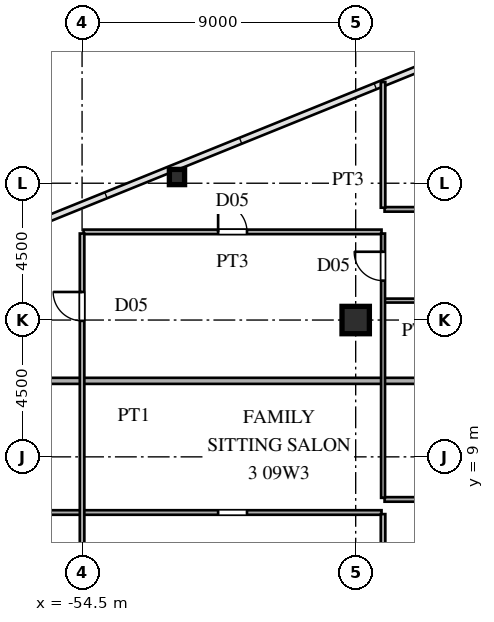
"""IFC4 building model, lengths in metres.
Left out: names, types, materials, properties, quantities, classifications, styles, units other than length and angle.
Written with IfcOpenShell. Run it as: python <this file> out.ifc"""

import sys

from ifc_helpers import new_model, si_unit, direction, frame, frame_2d, origin, origin_2d, place, context, subcontext, project, spatial, rectangle, hollow_rectangle, i_section, extrude, source, transform, mapped, element, fill, save


model = new_model("IFC4")
c1 = context("Model", 3, precision=1e-05, world=origin(), true_north=direction((0.0, 1.0)))
c2 = subcontext(c1, "Body", "Model", "MODEL_VIEW")
j1 = project(units=[si_unit("LENGTHUNIT", "METRE"), si_unit("PLANEANGLEUNIT", "RADIAN")], contexts=[c1])
p1 = place(None, origin())
s1 = spatial("IfcSite", under=j1, at=p1, CompositionType="ELEMENT")
p2 = place(p1, origin())
s2 = spatial("IfcBuilding", under=s1, at=p2, CompositionType="ELEMENT")
p3 = place(p2, frame((0.0, 0.0, 36.9)))
s3 = spatial("IfcBuildingStorey", under=s2, at=p3, CompositionType="ELEMENT", Elevation=36.9)
m1 = source(origin(), c2, "Body", "SweptSolid", [
    extrude(i_section(OverallWidth=0.9, OverallDepth=0.9, WebThickness=0.036, FlangeThickness=0.055, at=origin_2d()), origin(), (0.0, 0.0, 1.0), 3.6),
])
p4 = place(p3, frame((-45.5, 13.5, 0.0), z_axis=(0.0, 0.0, 1.0), x_axis=(1.0, 0.0, 0.0)))
e1 = element("IfcColumn", 1, at=p4, inside=s3, PredefinedType="COLUMN", context=c2, shape_type="MappedRepresentation", body=[
    mapped(m1, transform((0.0, 0.0, 0.0), scale=1.0)),
])
m2 = source(origin(), c2, "Body", "SweptSolid", [
    extrude(hollow_rectangle(XDim=0.5, YDim=0.5, WallThickness=0.02, at=origin_2d()), origin(), (0.0, 0.0, 1.0), 3.6),
])
p5 = place(p3, frame((-51.378, 18.204, 0.0), z_axis=(0.0, 0.0, 1.0), x_axis=(1.0, 0.0, 0.0)))
e2 = element("IfcColumn", 2, at=p5, inside=s3, PredefinedType="COLUMN", context=c2, shape_type="MappedRepresentation", body=[
    mapped(m2, transform((0.0, 0.0, 0.0), scale=1.0)),
])
p6 = place(p3, frame((-72.535, 7.17, 0.0), z_axis=(0.0, 0.0, 1.0), x_axis=(1.0, 0.0, 0.0)))
e3 = element("IfcWall", 3, at=p6, inside=s3, PredefinedType="PARTITIONING", context=c2, shape_type="SweptSolid", body=[
    extrude(rectangle(XDim=27.885, YDim=0.15, at=frame_2d((13.942, 0.0))), origin(), (0.0, 0.0, 1.0), 3.38),
])
p7 = place(p6, frame((22.51, 0.0, 0.0)))
e4 = element("IfcOpeningElement", 4, at=p7, cuts=e3, PredefinedType="OPENING", context=c2, shape_type="SweptSolid", body=[
    extrude(rectangle(XDim=0.95, YDim=2.15, at=frame_2d((0.475, 1.075))), frame((0.0, 0.085, 0.0), z_axis=(0.0, -1.0, 0.0), x_axis=(1.0, 0.0, 0.0)), (0.0, 0.0, 1.0), 0.17),
])
p8 = place(p6, frame((14.71, 0.0, 0.0)))
e5 = element("IfcOpeningElement", 5, at=p8, cuts=e3, PredefinedType="OPENING", context=c2, shape_type="SweptSolid", body=[
    extrude(rectangle(XDim=0.95, YDim=2.15, at=frame_2d((0.475, 1.075))), frame((0.0, 0.085, 0.0), z_axis=(0.0, -1.0, 0.0), x_axis=(1.0, 0.0, 0.0)), (0.0, 0.0, 1.0), 0.17),
])
p9 = place(p3, frame((-44.55, 7.6, 0.0), z_axis=(0.0, 0.0, 1.0), x_axis=(1.0, 0.0, 0.0)))
e6 = element("IfcWall", 6, at=p9, inside=s3, PredefinedType="PARTITIONING", context=c2, shape_type="SweptSolid", body=[
    extrude(rectangle(XDim=5.5, YDim=0.15, at=frame_2d((2.75, 0.0))), origin(), (0.0, 0.0, 1.0), 3.38),
])
p10 = place(p9, frame((2.275, 0.0, 0.0)))
e7 = element("IfcOpeningElement", 7, at=p10, cuts=e6, PredefinedType="OPENING", context=c2, shape_type="SweptSolid", body=[
    extrude(rectangle(XDim=0.95, YDim=2.15, at=frame_2d((0.475, 1.075))), frame((0.0, 0.085, 0.0), z_axis=(0.0, -1.0, 0.0), x_axis=(1.0, 0.0, 0.0)), (0.0, 0.0, 1.0), 0.17),
])
p11 = place(p3, frame((-68.807, 11.5, 0.0), z_axis=(0.0, 0.0, 1.0), x_axis=(1.0, 0.0, 0.0)))
e8 = element("IfcWall", 8, at=p11, inside=s3, PredefinedType="PARTITIONING", context=c2, shape_type="SweptSolid", body=[
    extrude(rectangle(XDim=29.727, YDim=0.2, at=frame_2d((14.863, 0.0))), origin(), (0.0, 0.0, 1.0), 3.38),
])
p12 = place(p3, frame((-44.55, 14.14, 0.0), z_axis=(0.0, 0.0, 1.0), x_axis=(1.0, 0.0, 0.0)))
e9 = element("IfcWall", 9, at=p12, inside=s3, PredefinedType="PARTITIONING", context=c2, shape_type="SweptSolid", body=[
    extrude(rectangle(XDim=5.5, YDim=0.13, at=frame_2d((2.75, 0.0))), origin(), (0.0, 0.0, 1.0), 3.38),
])
p13 = place(p12, frame((2.31, 0.0, 0.0)))
e10 = element("IfcOpeningElement", 10, at=p13, cuts=e9, PredefinedType="OPENING", context=c2, shape_type="SweptSolid", body=[
    extrude(rectangle(XDim=0.88, YDim=2.1, at=frame_2d((0.44, 1.05))), frame((0.0, 0.075, 0.0), z_axis=(0.0, -1.0, 0.0), x_axis=(1.0, 0.0, 0.0)), (0.0, 0.0, 1.0), 0.15),
])
p14 = place(p3, frame((-54.45, 16.4, 0.0), z_axis=(0.0, 0.0, 1.0), x_axis=(1.0, 0.0, 0.0)))
e11 = element("IfcWall", 11, at=p14, inside=s3, PredefinedType="PARTITIONING", context=c2, shape_type="SweptSolid", body=[
    extrude(rectangle(XDim=9.8, YDim=0.15, at=frame_2d((4.9, 0.0))), origin(), (0.0, 0.0, 1.0), 3.38),
])
p15 = place(p14, frame((4.425, 0.0, 0.0)))
e12 = element("IfcOpeningElement", 12, at=p15, cuts=e11, PredefinedType="OPENING", context=c2, shape_type="SweptSolid", body=[
    extrude(rectangle(XDim=0.95, YDim=2.15, at=frame_2d((0.475, 1.075))), frame((0.0, 0.085, 0.0), z_axis=(0.0, -1.0, 0.0), x_axis=(1.0, 0.0, 0.0)), (0.0, 0.0, 1.0), 0.17),
])
p16 = place(p3, frame((-44.55, 17.14, 0.0), z_axis=(0.0, 0.0, 1.0), x_axis=(1.0, 0.0, 0.0)))
e13 = element("IfcWall", 13, at=p16, inside=s3, PredefinedType="PARTITIONING", context=c2, shape_type="SweptSolid", body=[
    extrude(rectangle(XDim=5.55, YDim=0.15, at=frame_2d((2.775, 0.0))), origin(), (0.0, 0.0, 1.0), 3.38),
])
p17 = place(p16, frame((2.3, 0.0, 0.0)))
e14 = element("IfcOpeningElement", 14, at=p17, cuts=e13, PredefinedType="OPENING", context=c2, shape_type="SweptSolid", body=[
    extrude(rectangle(XDim=0.95, YDim=2.15, at=frame_2d((0.475, 1.075))), frame((0.0, 0.085, 0.0), z_axis=(0.0, -1.0, 0.0), x_axis=(1.0, 0.0, 0.0)), (0.0, 0.0, 1.0), 0.17),
])
p18 = place(p3, frame((-54.5, -17.321, 0.0), z_axis=(0.0, 0.0, 1.0), x_axis=(0.0, 1.0, 0.0)))
e15 = element("IfcWall", 15, at=p18, inside=s3, PredefinedType="PARTITIONING", context=c2, shape_type="SweptSolid", body=[
    extrude(rectangle(XDim=33.667, YDim=0.15, at=frame_2d((16.833, 0.0))), origin(), (0.0, 0.0, 1.0), 2.68),
])
p19 = place(p18, frame((0.988, 0.0, 0.0)))
e16 = element("IfcOpeningElement", 16, at=p19, cuts=e15, PredefinedType="OPENING", context=c2, shape_type="SweptSolid", body=[
    extrude(rectangle(XDim=0.95, YDim=2.15, at=frame_2d((0.475, 1.075))), frame((0.0, 0.085, 0.0), z_axis=(0.0, -1.0, 0.0), x_axis=(1.0, 0.0, 0.0)), (0.0, 0.0, 1.0), 0.17),
])
p20 = place(p18, frame((4.131, 0.0, 0.0)))
e17 = element("IfcOpeningElement", 17, at=p20, cuts=e15, PredefinedType="OPENING", context=c2, shape_type="SweptSolid", body=[
    extrude(rectangle(XDim=0.95, YDim=2.15, at=frame_2d((0.475, 1.075))), frame((0.0, 0.085, 0.0), z_axis=(0.0, -1.0, 0.0), x_axis=(1.0, 0.0, 0.0)), (0.0, 0.0, 1.0), 0.17),
])
p21 = place(p18, frame((8.221, 0.0, 0.0)))
e18 = element("IfcOpeningElement", 18, at=p21, cuts=e15, PredefinedType="OPENING", context=c2, shape_type="SweptSolid", body=[
    extrude(rectangle(XDim=0.95, YDim=2.15, at=frame_2d((0.475, 1.075))), frame((0.0, 0.085, 0.0), z_axis=(0.0, -1.0, 0.0), x_axis=(1.0, 0.0, 0.0)), (0.0, 0.0, 1.0), 0.17),
])
p22 = place(p18, frame((22.357, 0.0, 0.0)))
e19 = element("IfcOpeningElement", 19, at=p22, cuts=e15, PredefinedType="OPENING", context=c2, shape_type="SweptSolid", body=[
    extrude(rectangle(XDim=0.95, YDim=2.15, at=frame_2d((0.475, 1.075))), frame((0.0, 0.085, 0.0), z_axis=(0.0, -1.0, 0.0), x_axis=(1.0, 0.0, 0.0)), (0.0, 0.0, 1.0), 0.17),
])
p23 = place(p18, frame((30.794, 0.0, 0.0)))
e20 = element("IfcOpeningElement", 20, at=p23, cuts=e15, PredefinedType="OPENING", context=c2, shape_type="SweptSolid", body=[
    extrude(rectangle(XDim=0.95, YDim=2.15, at=frame_2d((0.475, 1.075))), frame((0.0, 0.085, 0.0), z_axis=(0.0, -1.0, 0.0), x_axis=(1.0, 0.0, 0.0)), (0.0, 0.0, 1.0), 0.17),
])
p24 = place(p3, frame((-44.6, 2.883, 0.0), z_axis=(0.0, 0.0, 1.0), x_axis=(0.0, 1.0, 0.0)))
e21 = element("IfcWall", 21, at=p24, inside=s3, PredefinedType="PARTITIONING", context=c2, shape_type="SweptSolid", body=[
    extrude(rectangle(XDim=4.234, YDim=0.15, at=frame_2d((2.117, 0.0))), origin(), (0.0, 0.0, 1.0), 3.38),
])
p25 = place(p24, frame((2.235, 0.0, 0.0)))
e22 = element("IfcOpeningElement", 22, at=p25, cuts=e21, PredefinedType="OPENING", context=c2, shape_type="SweptSolid", body=[
    extrude(rectangle(XDim=0.95, YDim=2.15, at=frame_2d((0.475, 1.075))), frame((0.0, 0.085, 0.0), z_axis=(0.0, -1.0, 0.0), x_axis=(1.0, 0.0, 0.0)), (0.0, 0.0, 1.0), 0.17),
])
p26 = place(p3, frame((-44.6, 7.652, 0.0), z_axis=(0.0, 0.0, 1.0), x_axis=(0.0, 1.0, 0.0)))
e23 = element("IfcWall", 23, at=p26, inside=s3, PredefinedType="PARTITIONING", context=c2, shape_type="SweptSolid", body=[
    extrude(rectangle(XDim=8.694, YDim=0.13, at=frame_2d((4.347, 0.0))), origin(), (0.0, 0.0, 1.0), 3.38),
])
p27 = place(p26, frame((7.144, 0.0, 0.0)))
e24 = element("IfcOpeningElement", 24, at=p27, cuts=e23, PredefinedType="OPENING", context=c2, shape_type="SweptSolid", body=[
    extrude(rectangle(XDim=0.95, YDim=2.15, at=frame_2d((0.475, 1.075))), frame((0.0, 0.075, 0.0), z_axis=(0.0, -1.0, 0.0), x_axis=(1.0, 0.0, 0.0)), (0.0, 0.0, 1.0), 0.15),
])
p28 = place(p3, frame((-44.6, 17.195, 0.0), z_axis=(0.0, 0.0, 1.0), x_axis=(0.0, 1.0, 0.0)))
e25 = element("IfcWall", 25, at=p28, inside=s3, PredefinedType="PARTITIONING", context=c2, shape_type="SweptSolid", body=[
    extrude(rectangle(XDim=4.133, YDim=0.15, at=frame_2d((2.066, 0.0))), origin(), (0.0, 0.0, 1.0), 3.38),
])
m3 = source(origin(), c2, "Body", "SweptSolid", [
    extrude(rectangle(XDim=0.95, YDim=2.15, at=frame_2d((0.475, 1.075))), frame((0.0, 0.025, 0.0), z_axis=(0.0, -1.0, 0.0), x_axis=(1.0, 0.0, 0.0)), (0.0, 0.0, 1.0), 0.05),
])
p29 = place(p15, origin())
e26 = element("IfcDoor", 26, at=p29, inside=s3, OperationType="SINGLE_SWING_LEFT", PredefinedType="DOOR", context=c2, shape_type="MappedRepresentation", body=[
    mapped(m3, transform((0.0, 0.0, 0.0), scale=1.0)),
])
fill(e12, e26)
p30 = place(p23, origin())
e27 = element("IfcDoor", 27, at=p30, inside=s3, OperationType="SINGLE_SWING_RIGHT", PredefinedType="DOOR", context=c2, shape_type="MappedRepresentation", body=[
    mapped(m3, transform((0.0, 0.0, 0.0), scale=1.0)),
])
fill(e20, e27)
p31 = place(p27, origin())
e28 = element("IfcDoor", 28, at=p31, inside=s3, OperationType="SINGLE_SWING_RIGHT", PredefinedType="DOOR", context=c2, shape_type="MappedRepresentation", body=[
    mapped(m3, transform((0.0, 0.0, 0.0), scale=1.0)),
])
fill(e24, e28)
save(model, sys.argv[1])
